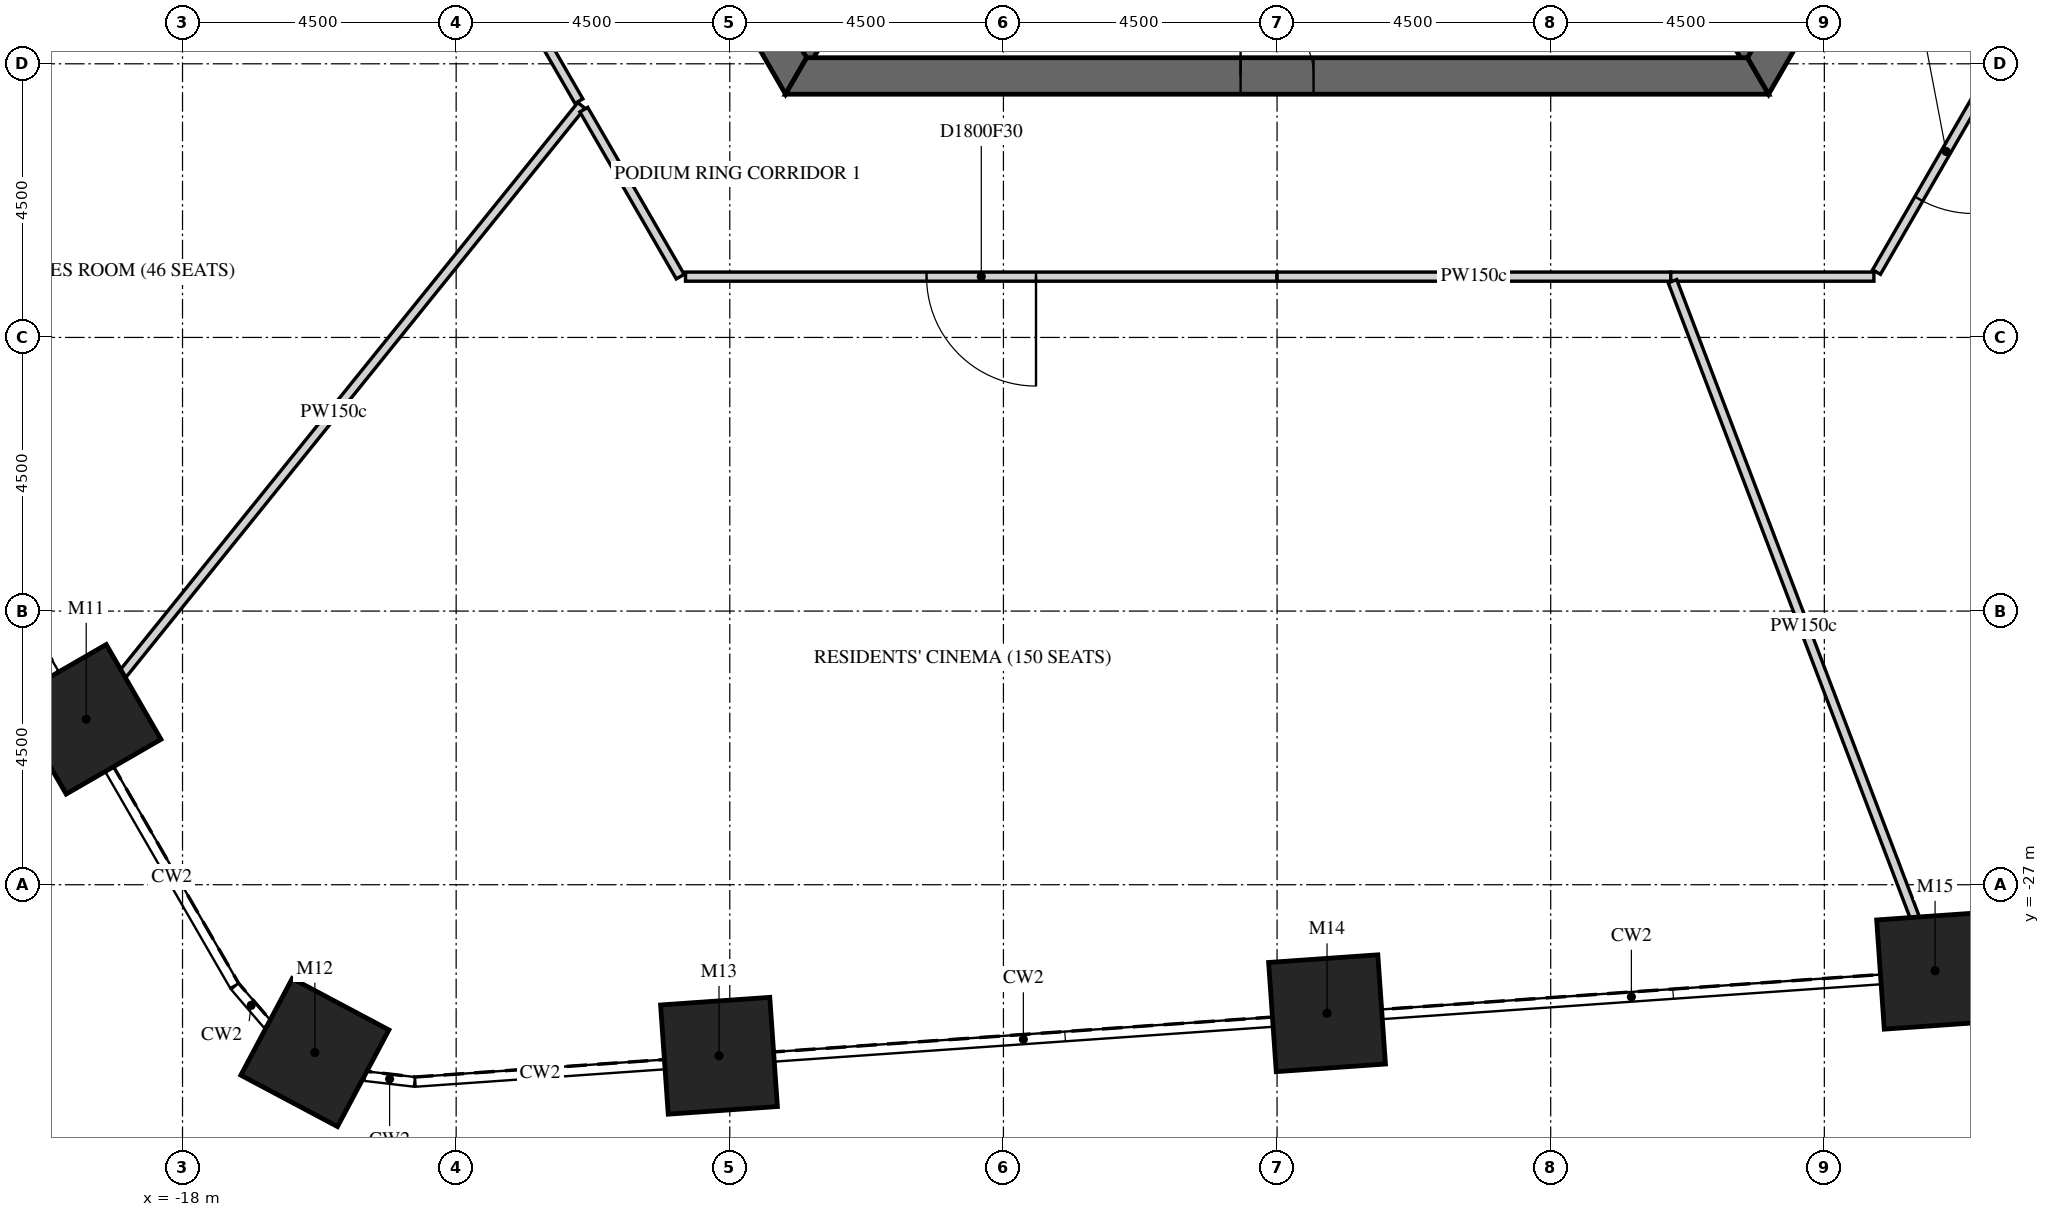
"""IFC4 building model, lengths in metres.
Left out: names, types, materials, properties, quantities, classifications, styles, units other than length and angle.
Written with IfcOpenShell. Run it as: python <this file> out.ifc"""

import sys

from ifc_helpers import new_model, si_unit, direction, frame, frame_2d, origin, origin_2d, place, context, subcontext, project, spatial, polyline, rectangle, outline, extrude, element, fill, save


model = new_model("IFC4")
c1 = context("Model", 3, precision=1e-05, world=origin(), true_north=direction((0.0, 1.0)))
c2 = subcontext(c1, "Body", "Model", "MODEL_VIEW")
j1 = project(units=[si_unit("LENGTHUNIT", "METRE"), si_unit("PLANEANGLEUNIT", "RADIAN")], contexts=[c1])
p1 = place(None, origin())
s1 = spatial("IfcSite", under=j1, at=p1, CompositionType="ELEMENT")
p2 = place(p1, origin())
s2 = spatial("IfcBuilding", under=s1, at=p2, CompositionType="ELEMENT")
p3 = place(p2, frame((0.0, 0.0, 26.0)))
s3 = spatial("IfcBuildingStorey", under=s2, at=p3, CompositionType="ELEMENT", Elevation=26.0)
for number, where, z_axis, x_axis in (
    (1, (-19.584, -24.28, -0.25), (0.0, 0.0, 1.0), (-0.5, 0.866, 0.0)),
    (2, (-15.823, -29.76, -0.25), (0.0, 0.0, 1.0), (-0.883, 0.469, 0.0)),
    (3, (-9.177, -29.813, -0.25), (0.0, 0.0, 1.0), (-0.998, -0.07, 0.0)),
    (4, (0.822, -29.114, -0.25), (0.0, 0.0, 1.0), (-0.998, -0.07, 0.0)),
    (5, (10.821, -28.414, -0.25), (0.0, 0.0, 1.0), (-0.998, -0.07, 0.0)),
):
    element("IfcColumn", number, at=place(p3, frame(where, z_axis=z_axis, x_axis=x_axis)), inside=s3, PredefinedType="COLUMN", context=c2, shape_type="SweptSolid", body=[
        extrude(rectangle(XDim=1.8, YDim=1.8, at=origin_2d()), origin(), (0.0, 0.0, 1.0), 5.45),
    ])
p4 = place(p3, frame((-15.819, 0.0, -0.25), z_axis=(0.0, 0.0, 1.0), x_axis=(0.499999880136, -0.866025472988, 0.0)))
e6 = element("IfcWall", 6, at=p4, inside=s3, PredefinedType="SHEAR", context=c2, shape_type="SweptSolid", body=[
    extrude(outline(polyline([(-0.173, -0.3), (15.993, -0.3), (15.646, 0.3), (0.173, 0.3), (-0.173, -0.3)])), origin(), (0.0, 0.0, 1.0), 5.45),
])
p5 = place(p4, frame((6.981, 0.0, 0.25)))
e7 = element("IfcOpeningElement", 7, at=p5, cuts=e6, PredefinedType="OPENING", context=c2, shape_type="SweptSolid", body=[
    extrude(rectangle(XDim=1.8, YDim=2.4, at=frame_2d((0.9, 1.2))), frame((0.0, 0.31, 0.0), z_axis=(0.0, -1.0, 0.0), x_axis=(1.0, 0.0, 0.0)), (0.0, 0.0, 1.0), 0.62),
])
p6 = place(p3, frame((-7.91, -13.7, -0.25), z_axis=(0.0, 0.0, 1.0), x_axis=(1.0, 0.0, 0.0)))
e8 = element("IfcWall", 8, at=p6, inside=s3, PredefinedType="SHEAR", context=c2, shape_type="SweptSolid", body=[
    extrude(outline(polyline([(-0.173, -0.3), (15.993, -0.3), (15.646, 0.3), (0.173, 0.3), (-0.173, -0.3)])), origin(), (0.0, 0.0, 1.0), 5.45),
])
p7 = place(p6, frame((7.31, 0.0, 0.25)))
e9 = element("IfcOpeningElement", 9, at=p7, cuts=e8, PredefinedType="OPENING", context=c2, shape_type="SweptSolid", body=[
    extrude(rectangle(XDim=1.2, YDim=2.4, at=frame_2d((0.6, 1.2))), frame((0.0, 0.31, 0.0), z_axis=(0.0, -1.0, 0.0), x_axis=(1.0, 0.0, 0.0)), (0.0, 0.0, 1.0), 0.62),
])
p8 = place(p3, frame((7.91, -13.7, -0.25), z_axis=(0.0, 0.0, 1.0), x_axis=(0.499999880136, 0.866025472988, 0.0)))
e10 = element("IfcWall", 10, at=p8, inside=s3, PredefinedType="SHEAR", context=c2, shape_type="SweptSolid", body=[
    extrude(outline(polyline([(-0.173, -0.3), (15.993, -0.3), (15.646, 0.3), (0.173, 0.3), (-0.173, -0.3)])), origin(), (0.0, 0.0, 1.0), 5.45),
])
p9 = place(p8, frame((7.039, 0.0, 0.25)))
e11 = element("IfcOpeningElement", 11, at=p9, cuts=e10, PredefinedType="OPENING", context=c2, shape_type="SweptSolid", body=[
    extrude(rectangle(XDim=1.8, YDim=2.4, at=frame_2d((0.9, 1.2))), frame((0.0, 0.31, 0.0), z_axis=(0.0, -1.0, 0.0), x_axis=(1.0, 0.0, 0.0)), (0.0, 0.0, 1.0), 0.62),
])
for number, where, z_axis, x_axis in (
    (12, (-5.773, -10.0, -0.25), (0.0, 0.0, 1.0), (-0.5, -0.866, 0.0)),
    (13, (5.773, -10.0, -0.25), (0.0, 0.0, 1.0), (0.5, -0.866, 0.0)),
):
    element("IfcWall", number, at=place(p3, frame(where, z_axis=z_axis, x_axis=x_axis)), inside=s3, PredefinedType="SHEAR", context=c2, shape_type="SweptSolid", body=[
        extrude(rectangle(XDim=3.926, YDim=0.2, at=frame_2d((1.963, 0.0))), origin(), (0.0, 0.0, 1.0), 5.45),
    ])
p10 = place(p3, frame((-24.596, -15.599, 0.0), z_axis=(0.0, 0.0, 1.0), x_axis=(0.844484782983, 0.535579547136, 0.0)))
e14 = element("IfcWall", 14, at=p10, inside=s3, PredefinedType="PARTITIONING", context=c2, shape_type="SweptSolid", body=[
    extrude(rectangle(XDim=12.11, YDim=0.15, at=frame_2d((6.055, 0.0))), origin(), (0.0, 0.0, 1.0), 4.273),
])
p11 = place(p3, frame((-19.584, -24.28, 0.0), z_axis=(0.0, 0.0, 1.0), x_axis=(0.627807267634, 0.77836882948, 0.0)))
e15 = element("IfcWall", 15, at=p11, inside=s3, PredefinedType="PARTITIONING", context=c2, shape_type="SweptSolid", body=[
    extrude(rectangle(XDim=12.971, YDim=0.15, at=frame_2d((6.485, 0.0))), origin(), (0.0, 0.0, 1.0), 5.2),
])
p12 = place(p3, frame((-11.481, -14.114, 0.0), z_axis=(0.0, 0.0, 1.0), x_axis=(-0.500049947645, 0.865996564577, 0.0)))
e16 = element("IfcWall", 16, at=p12, inside=s3, PredefinedType="PARTITIONING", context=c2, shape_type="SweptSolid", body=[
    extrude(rectangle(XDim=5.7, YDim=0.15, at=frame_2d((2.85, 0.0))), origin(), (0.0, 0.0, 1.0), 5.2),
])
p13 = place(p12, frame((2.35, 0.0, 0.0)))
e17 = element("IfcOpeningElement", 17, at=p13, cuts=e16, PredefinedType="OPENING", context=c2, shape_type="SweptSolid", body=[
    extrude(rectangle(XDim=1.0, YDim=2.1, at=frame_2d((0.5, 1.05))), frame((0.0, 0.085, 0.0), z_axis=(0.0, -1.0, 0.0), x_axis=(1.0, 0.0, 0.0)), (0.0, 0.0, 1.0), 0.17),
])
p14 = place(p3, frame((-11.401, -14.254, 0.0), z_axis=(0.0, 0.0, 1.0), x_axis=(0.500080068905, -0.865979171045, 0.0)))
e18 = element("IfcWall", 18, at=p14, inside=s3, PredefinedType="PARTITIONING", context=c2, shape_type="SweptSolid", body=[
    extrude(rectangle(XDim=3.171, YDim=0.15, at=frame_2d((1.586, 0.0))), origin(), (0.0, 0.0, 1.0), 5.2),
])
p15 = place(p3, frame((0.0, -17.0, 0.0), z_axis=(0.0, 0.0, 1.0), x_axis=(-1.0, 0.0, 0.0)))
e19 = element("IfcWall", 19, at=p15, inside=s3, PredefinedType="PARTITIONING", context=c2, shape_type="SweptSolid", body=[
    extrude(rectangle(XDim=9.729, YDim=0.15, at=frame_2d((4.864, 0.0))), origin(), (0.0, 0.0, 1.0), 5.2),
])
p16 = place(p15, frame((3.964, 0.0, 0.0)))
e20 = element("IfcOpeningElement", 20, at=p16, cuts=e19, PredefinedType="OPENING", context=c2, shape_type="SweptSolid", body=[
    extrude(rectangle(XDim=1.8, YDim=2.1, at=frame_2d((0.9, 1.05))), frame((0.0, 0.085, 0.0), z_axis=(0.0, -1.0, 0.0), x_axis=(1.0, 0.0, 0.0)), (0.0, 0.0, 1.0), 0.17),
])
p17 = place(p3, frame((0.0, -17.0, 0.0), z_axis=(0.0, 0.0, 1.0), x_axis=(1.0, 0.0, 0.0)))
e21 = element("IfcWall", 21, at=p17, inside=s3, PredefinedType="PARTITIONING", context=c2, shape_type="SweptSolid", body=[
    extrude(rectangle(XDim=6.474, YDim=0.15, at=frame_2d((3.237, 0.0))), origin(), (0.0, 0.0, 1.0), 5.2),
])
p18 = place(p3, frame((6.474, -17.0, 0.0), z_axis=(0.0, 0.0, 1.0), x_axis=(1.0, 0.0, 0.0)))
e22 = element("IfcWall", 22, at=p18, inside=s3, PredefinedType="PARTITIONING", context=c2, shape_type="SweptSolid", body=[
    extrude(rectangle(XDim=3.341, YDim=0.15, at=frame_2d((1.67, 0.0))), origin(), (0.0, 0.0, 1.0), 5.2),
])
p19 = place(p3, frame((12.148, -12.959, 0.0), z_axis=(0.0, 0.0, 1.0), x_axis=(-0.499957811549, -0.866049759928, 0.0)))
e23 = element("IfcWall", 23, at=p19, inside=s3, PredefinedType="PARTITIONING", context=c2, shape_type="SweptSolid", body=[
    extrude(rectangle(XDim=4.58, YDim=0.15, at=frame_2d((2.29, 0.0))), origin(), (0.0, 0.0, 1.0), 5.2),
])
p20 = place(p19, frame((1.39, 0.0, 0.0)))
e24 = element("IfcOpeningElement", 24, at=p20, cuts=e23, PredefinedType="OPENING", context=c2, shape_type="SweptSolid", body=[
    extrude(rectangle(XDim=1.8, YDim=2.1, at=frame_2d((0.9, 1.05))), frame((0.0, 0.085, 0.0), z_axis=(0.0, -1.0, 0.0), x_axis=(1.0, 0.0, 0.0)), (0.0, 0.0, 1.0), 0.17),
])
p21 = place(p3, frame((10.821, -28.414, 0.0), z_axis=(0.0, 0.0, 1.0), x_axis=(-0.355901613379, 0.934523430201, 0.0)))
e25 = element("IfcWall", 25, at=p21, inside=s3, PredefinedType="PARTITIONING", context=c2, shape_type="SweptSolid", body=[
    extrude(rectangle(XDim=12.134, YDim=0.15, at=frame_2d((6.067, 0.0))), origin(), (0.0, 0.0, 1.0), 5.2),
])
p22 = place(p7, origin())
e26 = element("IfcDoor", 26, at=p22, inside=s3, OperationType="SINGLE_SWING_LEFT", PredefinedType="DOOR", context=c2, shape_type="SweptSolid", body=[
    extrude(rectangle(XDim=1.2, YDim=2.4, at=frame_2d((0.6, 1.2))), frame((0.0, 0.025, 0.0), z_axis=(0.0, -1.0, 0.0), x_axis=(1.0, 0.0, 0.0)), (0.0, 0.0, 1.0), 0.05),
])
fill(e9, e26)
p23 = place(p16, origin())
e27 = element("IfcDoor", 27, at=p23, inside=s3, OperationType="DOUBLE_DOOR_SINGLE_SWING", PredefinedType="DOOR", context=c2, shape_type="SweptSolid", body=[
    extrude(rectangle(XDim=1.8, YDim=2.1, at=frame_2d((0.9, 1.05))), frame((0.0, 0.025, 0.0), z_axis=(0.0, -1.0, 0.0), x_axis=(1.0, 0.0, 0.0)), (0.0, 0.0, 1.0), 0.05),
])
fill(e20, e27)
p24 = place(p20, origin())
e28 = element("IfcDoor", 28, at=p24, inside=s3, OperationType="DOUBLE_DOOR_SINGLE_SWING", PredefinedType="DOOR", context=c2, shape_type="SweptSolid", body=[
    extrude(rectangle(XDim=1.8, YDim=2.1, at=frame_2d((0.9, 1.05))), frame((0.0, 0.025, 0.0), z_axis=(0.0, -1.0, 0.0), x_axis=(1.0, 0.0, 0.0)), (0.0, 0.0, 1.0), 0.05),
])
fill(e24, e28)
save(model, sys.argv[1])
